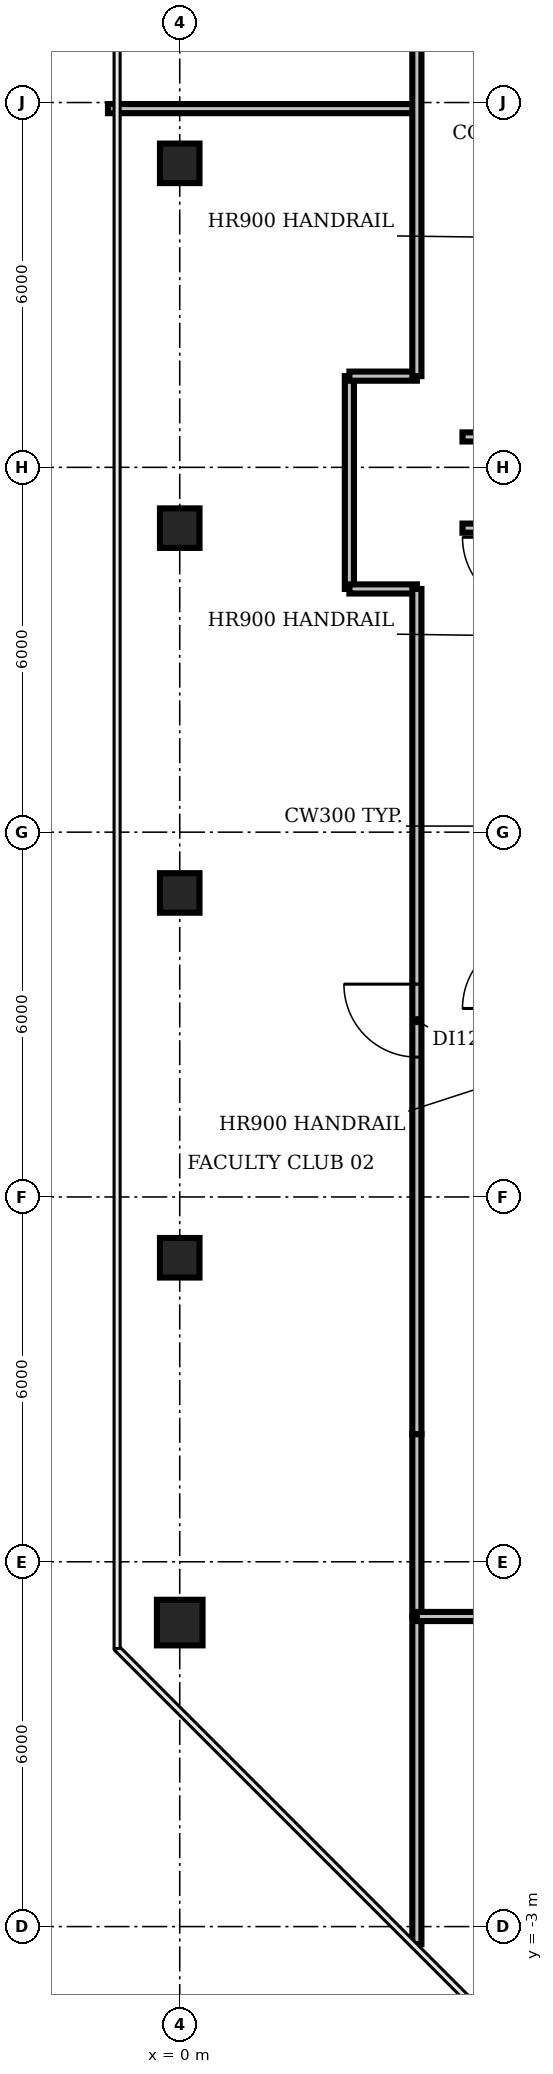
"""IFC4 building model, lengths in metres.
Left out: names, types, materials, properties, quantities, classifications, styles, units other than length and angle.
Written with IfcOpenShell. Run it as: python <this file> out.ifc"""

import sys

from ifc_helpers import new_model, si_unit, direction, frame, frame_2d, origin, origin_2d, place, context, subcontext, project, spatial, rectangle, circle, extrude, element, fill, save


model = new_model("IFC4")
c1 = context("Model", 3, precision=1e-05, world=origin(), true_north=direction((0.0, 1.0)))
c2 = subcontext(c1, "Body", "Model", "MODEL_VIEW")
j1 = project(units=[si_unit("LENGTHUNIT", "METRE"), si_unit("PLANEANGLEUNIT", "RADIAN")], contexts=[c1])
p1 = place(None, origin())
s1 = spatial("IfcSite", under=j1, at=p1, CompositionType="ELEMENT")
p2 = place(p1, origin())
s2 = spatial("IfcBuilding", under=s1, at=p2, CompositionType="ELEMENT")
p3 = place(p2, frame((0.0, 0.0, 323.0)))
s3 = spatial("IfcBuildingStorey", under=s2, at=p3, CompositionType="ELEMENT", Elevation=323.0)
p4 = place(p3, frame((0.0, 2.0, 0.0), z_axis=(0.0, 0.0, 1.0), x_axis=(1.0, 0.0, 0.0)))
e1 = element("IfcColumn", 1, at=p4, inside=s3, PredefinedType="COLUMN", context=c2, shape_type="SweptSolid", body=[
    extrude(circle(Radius=0.375, at=origin_2d()), origin(), (0.0, 0.0, 1.0), 3.9),
])
for number, where, z_axis, x_axis in (
    (2, (0.0, 8.0, 0.0), (0.0, 0.0, 1.0), (1.0, 0.0, 0.0)),
    (3, (0.0, 14.0, 0.0), (0.0, 0.0, 1.0), (1.0, 0.0, 0.0)),
    (4, (0.0, 20.0, 0.0), (0.0, 0.0, 1.0), (1.0, 0.0, 0.0)),
    (5, (0.0, 26.0, 0.0), (0.0, 0.0, 1.0), (1.0, 0.0, 0.0)),
):
    element("IfcColumn", number, at=place(p3, frame(where, z_axis=z_axis, x_axis=x_axis)), inside=s3, PredefinedType="COLUMN", context=c2, shape_type="SweptSolid", body=[
        extrude(rectangle(XDim=0.65, YDim=0.65, at=origin_2d()), origin(), (0.0, 0.0, 1.0), 3.9),
    ])
p5 = place(p3, frame((-1.18, 26.9, 0.0), z_axis=(0.0, 0.0, 1.0), x_axis=(1.0, 0.0, 0.0)))
e6 = element("IfcWall", 6, at=p5, inside=s3, PredefinedType="PARTITIONING", context=c2, shape_type="SweptSolid", body=[
    extrude(rectangle(XDim=5.08, YDim=0.15, at=frame_2d((2.54, 0.0))), origin(), (0.0, 0.0, 1.0), 2.48),
])
p6 = place(p3, frame((2.79, 19.0, 0.0), z_axis=(0.0, 0.0, 1.0), x_axis=(0.0, 1.0, 0.0)))
e7 = element("IfcWall", 7, at=p6, inside=s3, PredefinedType="PARTITIONING", context=c2, shape_type="SweptSolid", body=[
    extrude(rectangle(XDim=3.5, YDim=0.15, at=frame_2d((1.75, 0.0))), origin(), (0.0, 0.0, 1.0), 2.48),
])
for number, where, z_axis, x_axis in (
    (8, (2.79, 19.0, 0.0), (0.0, 0.0, 1.0), (1.0, 0.0, 0.0)),
    (9, (2.79, 22.5, 0.0), (0.0, 0.0, 1.0), (1.0, 0.0, 0.0)),
):
    element("IfcWall", number, at=place(p3, frame(where, z_axis=z_axis, x_axis=x_axis)), inside=s3, PredefinedType="PARTITIONING", context=c2, shape_type="SweptSolid", body=[
        extrude(rectangle(XDim=1.11, YDim=0.15, at=frame_2d((0.555, 0.0))), origin(), (0.0, 0.0, 1.0), 2.48),
    ])
p7 = place(p3, frame((3.9, -3.29, 0.0), z_axis=(0.0, 0.0, 1.0), x_axis=(0.0, 1.0, 0.0)))
e10 = element("IfcWall", 10, at=p7, inside=s3, PredefinedType="PARTITIONING", context=c2, shape_type="SweptSolid", body=[
    extrude(rectangle(XDim=5.39, YDim=0.15, at=frame_2d((2.695, 0.0))), origin(), (0.0, 0.0, 1.0), 2.48),
])
p8 = place(p3, frame((3.9, 2.1, 0.0), z_axis=(0.0, 0.0, 1.0), x_axis=(0.0, 1.0, 0.0)))
e11 = element("IfcWall", 11, at=p8, inside=s3, PredefinedType="PARTITIONING", context=c2, shape_type="SweptSolid", body=[
    extrude(rectangle(XDim=3.0, YDim=0.15, at=frame_2d((1.5, 0.0))), origin(), (0.0, 0.0, 1.0), 2.48),
])
p9 = place(p3, frame((3.9, 5.1, 0.0), z_axis=(0.0, 0.0, 1.0), x_axis=(0.0, 1.0, 0.0)))
e12 = element("IfcWall", 12, at=p9, inside=s3, PredefinedType="PARTITIONING", context=c2, shape_type="SweptSolid", body=[
    extrude(rectangle(XDim=13.9, YDim=0.15, at=frame_2d((6.95, 0.0))), origin(), (0.0, 0.0, 1.0), 2.48),
])
p10 = place(p9, frame((6.2, 0.0, 0.0)))
e13 = element("IfcOpeningElement", 13, at=p10, cuts=e12, PredefinedType="OPENING", context=c2, shape_type="SweptSolid", body=[
    extrude(rectangle(XDim=1.2, YDim=2.1, at=frame_2d((0.6, 1.05))), frame((0.0, 0.085, 0.0), z_axis=(0.0, -1.0, 0.0), x_axis=(1.0, 0.0, 0.0)), (0.0, 0.0, 1.0), 0.17),
])
p11 = place(p3, frame((3.9, 22.5, 0.0), z_axis=(0.0, 0.0, 1.0), x_axis=(0.0, 1.0, 0.0)))
e14 = element("IfcWall", 14, at=p11, inside=s3, PredefinedType="PARTITIONING", context=c2, shape_type="SweptSolid", body=[
    extrude(rectangle(XDim=5.6, YDim=0.15, at=frame_2d((2.8, 0.0))), origin(), (0.0, 0.0, 1.0), 2.48),
])
for number, where, z_axis, x_axis in (
    (15, (4.65, 20.0, 0.0), (0.0, 0.0, 1.0), (1.0, 0.0, 0.0)),
    (16, (4.65, 21.5, 0.0), (0.0, 0.0, 1.0), (1.0, 0.0, 0.0)),
):
    element("IfcWall", number, at=place(p3, frame(where, z_axis=z_axis, x_axis=x_axis)), inside=s3, PredefinedType="PARTITIONING", context=c2, shape_type="SweptSolid", body=[
        extrude(rectangle(XDim=1.05, YDim=0.15, at=frame_2d((0.525, 0.0))), origin(), (0.0, 0.0, 1.0), 2.48),
    ])
p12 = place(p3, frame((26.1, 2.1, 0.0), z_axis=(0.0, 0.0, 1.0), x_axis=(-1.0, 0.0, 0.0)))
e17 = element("IfcWall", 17, at=p12, inside=s3, PredefinedType="PARTITIONING", context=c2, shape_type="SweptSolid", body=[
    extrude(rectangle(XDim=22.2, YDim=0.15, at=frame_2d((11.1, 0.0))), origin(), (0.0, 0.0, 1.0), 2.48),
])
p13 = place(p12, frame((10.6, 0.0, 0.0)))
e18 = element("IfcOpeningElement", 18, at=p13, cuts=e17, PredefinedType="OPENING", context=c2, shape_type="SweptSolid", body=[
    extrude(rectangle(XDim=1.2, YDim=2.1, at=frame_2d((0.6, 1.05))), frame((0.0, 0.085, 0.0), z_axis=(0.0, -1.0, 0.0), x_axis=(1.0, 0.0, 0.0)), (0.0, 0.0, 1.0), 0.17),
])
p14 = place(p10, origin())
e19 = element("IfcDoor", 19, at=p14, inside=s3, OperationType="SINGLE_SWING_RIGHT", PredefinedType="DOOR", context=c2, shape_type="SweptSolid", body=[
    extrude(rectangle(XDim=1.2, YDim=2.1, at=frame_2d((0.6, 1.05))), frame((0.0, 0.025, 0.0), z_axis=(0.0, -1.0, 0.0), x_axis=(1.0, 0.0, 0.0)), (0.0, 0.0, 1.0), 0.05),
])
fill(e13, e19)
save(model, sys.argv[1])
